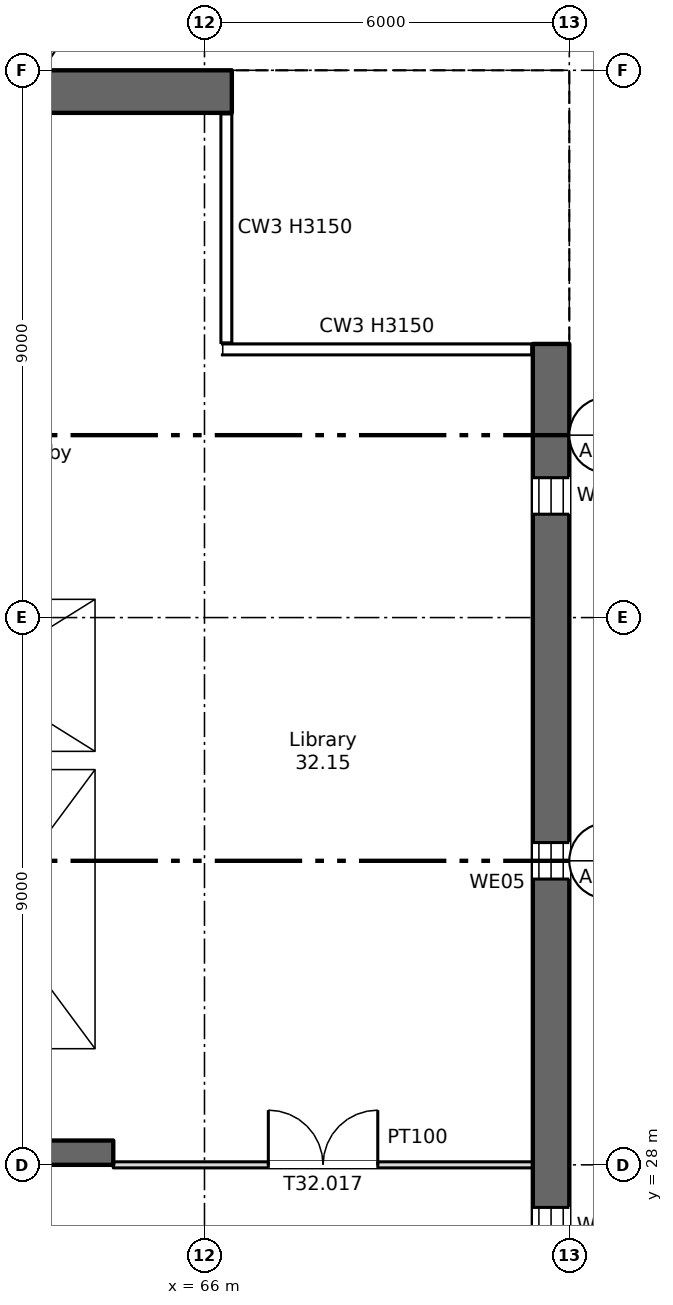
"""IFC4 building model, lengths in metres.
Left out: names, types, materials, properties, quantities, classifications, styles, units other than length and angle.
Written with IfcOpenShell. Run it as: python <this file> out.ifc"""

import sys

from ifc_helpers import new_model, si_unit, direction, frame, frame_2d, origin, place, context, subcontext, project, spatial, rectangle, extrude, element, fill, save


model = new_model("IFC4")
c1 = context("Model", 3, precision=1e-05, world=origin(), true_north=direction((0.0, 1.0)))
c2 = subcontext(c1, "Body", "Model", "MODEL_VIEW")
j1 = project(units=[si_unit("LENGTHUNIT", "METRE"), si_unit("PLANEANGLEUNIT", "RADIAN")], contexts=[c1])
p1 = place(None, origin())
s1 = spatial("IfcSite", under=j1, at=p1, CompositionType="ELEMENT")
p2 = place(p1, origin())
s2 = spatial("IfcBuilding", under=s1, at=p2, CompositionType="ELEMENT")
p3 = place(p2, frame((0.0, 0.0, 223.0)))
s3 = spatial("IfcBuildingStorey", under=s2, at=p3, CompositionType="ELEMENT", Elevation=223.0)
p4 = place(p3, frame((71.7, 7.5, 0.0), z_axis=(0.0, 0.0, 1.0), x_axis=(0.0, 1.0, 0.0)))
e1 = element("IfcWall", 1, at=p4, inside=s3, PredefinedType="SHEAR", context=c2, shape_type="SweptSolid", body=[
    extrude(rectangle(XDim=34.0, YDim=0.6, at=frame_2d((17.0, 0.0))), origin(), (0.0, 0.0, 1.0), 3.15),
])
p5 = place(p4, frame((1.2, 0.0, 0.6)))
e2 = element("IfcOpeningElement", 2, at=p5, cuts=e1, PredefinedType="OPENING", context=c2, shape_type="SweptSolid", body=[
    extrude(rectangle(XDim=0.6, YDim=2.4, at=frame_2d((0.3, 1.2))), frame((0.0, 0.31, 0.0), z_axis=(0.0, -1.0, 0.0), x_axis=(1.0, 0.0, 0.0)), (0.0, 0.0, 1.0), 0.62),
])
p6 = place(p4, frame((7.2, 0.0, 0.6)))
e3 = element("IfcOpeningElement", 3, at=p6, cuts=e1, PredefinedType="OPENING", context=c2, shape_type="SweptSolid", body=[
    extrude(rectangle(XDim=0.6, YDim=2.4, at=frame_2d((0.3, 1.2))), frame((0.0, 0.31, 0.0), z_axis=(0.0, -1.0, 0.0), x_axis=(1.0, 0.0, 0.0)), (0.0, 0.0, 1.0), 0.62),
])
p7 = place(p4, frame((13.2, 0.0, 0.6)))
e4 = element("IfcOpeningElement", 4, at=p7, cuts=e1, PredefinedType="OPENING", context=c2, shape_type="SweptSolid", body=[
    extrude(rectangle(XDim=0.6, YDim=2.4, at=frame_2d((0.3, 1.2))), frame((0.0, 0.31, 0.0), z_axis=(0.0, -1.0, 0.0), x_axis=(1.0, 0.0, 0.0)), (0.0, 0.0, 1.0), 0.62),
])
p8 = place(p4, frame((19.2, 0.0, 0.6)))
e5 = element("IfcOpeningElement", 5, at=p8, cuts=e1, PredefinedType="OPENING", context=c2, shape_type="SweptSolid", body=[
    extrude(rectangle(XDim=0.6, YDim=2.4, at=frame_2d((0.3, 1.2))), frame((0.0, 0.31, 0.0), z_axis=(0.0, -1.0, 0.0), x_axis=(1.0, 0.0, 0.0)), (0.0, 0.0, 1.0), 0.62),
])
p9 = place(p4, frame((25.2, 0.0, 0.6)))
e6 = element("IfcOpeningElement", 6, at=p9, cuts=e1, PredefinedType="OPENING", context=c2, shape_type="SweptSolid", body=[
    extrude(rectangle(XDim=0.6, YDim=2.4, at=frame_2d((0.3, 1.2))), frame((0.0, 0.31, 0.0), z_axis=(0.0, -1.0, 0.0), x_axis=(1.0, 0.0, 0.0)), (0.0, 0.0, 1.0), 0.62),
])
p10 = place(p4, frame((31.2, 0.0, 0.6)))
e7 = element("IfcOpeningElement", 7, at=p10, cuts=e1, PredefinedType="OPENING", context=c2, shape_type="SweptSolid", body=[
    extrude(rectangle(XDim=0.6, YDim=2.4, at=frame_2d((0.3, 1.2))), frame((0.0, 0.31, 0.0), z_axis=(0.0, -1.0, 0.0), x_axis=(1.0, 0.0, 0.0)), (0.0, 0.0, 1.0), 0.62),
])
p11 = place(p3, frame((11.55, 45.65, 0.0), z_axis=(0.0, 0.0, 1.0), x_axis=(1.0, 0.0, 0.0)))
e8 = element("IfcWall", 8, at=p11, inside=s3, PredefinedType="SHEAR", context=c2, shape_type="SweptSolid", body=[
    extrude(rectangle(XDim=54.9, YDim=0.7, at=frame_2d((27.45, 0.0))), origin(), (0.0, 0.0, 1.0), 3.15),
])
p12 = place(p11, frame((1.2, 0.0, 0.6)))
e9 = element("IfcOpeningElement", 9, at=p12, cuts=e8, PredefinedType="OPENING", context=c2, shape_type="SweptSolid", body=[
    extrude(rectangle(XDim=0.6, YDim=2.4, at=frame_2d((0.3, 1.2))), frame((0.0, 0.36, 0.0), z_axis=(0.0, -1.0, 0.0), x_axis=(1.0, 0.0, 0.0)), (0.0, 0.0, 1.0), 0.72),
])
p13 = place(p3, frame((6.6, 28.2, 0.0), z_axis=(0.0, 0.0, 1.0), x_axis=(1.0, 0.0, 0.0)))
e10 = element("IfcWall", 10, at=p13, inside=s3, PredefinedType="SHEAR", context=c2, shape_type="SweptSolid", body=[
    extrude(rectangle(XDim=57.9, YDim=0.4, at=frame_2d((28.95, 0.0))), origin(), (0.0, 0.0, 1.0), 3.15),
])
p14 = place(p13, frame((12.163, 0.0, 0.0)))
e11 = element("IfcOpeningElement", 11, at=p14, cuts=e10, PredefinedType="OPENING", context=c2, shape_type="SweptSolid", body=[
    extrude(rectangle(XDim=0.9, YDim=2.1, at=frame_2d((0.45, 1.05))), frame((0.0, 0.21, 0.0), z_axis=(0.0, -1.0, 0.0), x_axis=(1.0, 0.0, 0.0)), (0.0, 0.0, 1.0), 0.42),
])
p15 = place(p13, frame((14.738, 0.0, 0.0)))
e12 = element("IfcOpeningElement", 12, at=p15, cuts=e10, PredefinedType="OPENING", context=c2, shape_type="SweptSolid", body=[
    extrude(rectangle(XDim=0.9, YDim=2.1, at=frame_2d((0.45, 1.05))), frame((0.0, 0.21, 0.0), z_axis=(0.0, -1.0, 0.0), x_axis=(1.0, 0.0, 0.0)), (0.0, 0.0, 1.0), 0.42),
])
p16 = place(p13, frame((49.163, 0.0, 0.0)))
e13 = element("IfcOpeningElement", 13, at=p16, cuts=e10, PredefinedType="OPENING", context=c2, shape_type="SweptSolid", body=[
    extrude(rectangle(XDim=0.9, YDim=2.1, at=frame_2d((0.45, 1.05))), frame((0.0, 0.21, 0.0), z_axis=(0.0, -1.0, 0.0), x_axis=(1.0, 0.0, 0.0)), (0.0, 0.0, 1.0), 0.42),
])
p17 = place(p13, frame((51.738, 0.0, 0.0)))
e14 = element("IfcOpeningElement", 14, at=p17, cuts=e10, PredefinedType="OPENING", context=c2, shape_type="SweptSolid", body=[
    extrude(rectangle(XDim=0.9, YDim=2.1, at=frame_2d((0.45, 1.05))), frame((0.0, 0.21, 0.0), z_axis=(0.0, -1.0, 0.0), x_axis=(1.0, 0.0, 0.0)), (0.0, 0.0, 1.0), 0.42),
])
p18 = place(p13, frame((1.45, 0.0, 0.0)))
e15 = element("IfcOpeningElement", 15, at=p18, cuts=e10, PredefinedType="OPENING", context=c2, shape_type="SweptSolid", body=[
    extrude(rectangle(XDim=0.9, YDim=2.1, at=frame_2d((0.45, 1.05))), frame((0.0, 0.21, 0.0), z_axis=(0.0, -1.0, 0.0), x_axis=(1.0, 0.0, 0.0)), (0.0, 0.0, 1.0), 0.42),
])
p19 = place(p13, frame((4.8, 0.0, 0.0)))
e16 = element("IfcOpeningElement", 16, at=p19, cuts=e10, PredefinedType="OPENING", context=c2, shape_type="SweptSolid", body=[
    extrude(rectangle(XDim=1.2, YDim=2.1, at=frame_2d((0.6, 1.05))), frame((0.0, 0.21, 0.0), z_axis=(0.0, -1.0, 0.0), x_axis=(1.0, 0.0, 0.0)), (0.0, 0.0, 1.0), 0.42),
])
p20 = place(p13, frame((31.8, 0.0, 0.0)))
e17 = element("IfcOpeningElement", 17, at=p20, cuts=e10, PredefinedType="OPENING", context=c2, shape_type="SweptSolid", body=[
    extrude(rectangle(XDim=1.2, YDim=2.1, at=frame_2d((0.6, 1.05))), frame((0.0, 0.21, 0.0), z_axis=(0.0, -1.0, 0.0), x_axis=(1.0, 0.0, 0.0)), (0.0, 0.0, 1.0), 0.42),
])
p21 = place(p13, frame((55.3, 0.0, 0.0)))
e18 = element("IfcOpeningElement", 18, at=p21, cuts=e10, PredefinedType="OPENING", context=c2, shape_type="SweptSolid", body=[
    extrude(rectangle(XDim=1.2, YDim=2.1, at=frame_2d((0.6, 1.05))), frame((0.0, 0.21, 0.0), z_axis=(0.0, -1.0, 0.0), x_axis=(1.0, 0.0, 0.0)), (0.0, 0.0, 1.0), 0.42),
])
p22 = place(p13, frame((21.8, 0.0, 0.0)))
e19 = element("IfcOpeningElement", 19, at=p22, cuts=e10, PredefinedType="OPENING", context=c2, shape_type="SweptSolid", body=[
    extrude(rectangle(XDim=1.2, YDim=2.1, at=frame_2d((0.6, 1.05))), frame((0.0, 0.21, 0.0), z_axis=(0.0, -1.0, 0.0), x_axis=(1.0, 0.0, 0.0)), (0.0, 0.0, 1.0), 0.42),
])
p23 = place(p13, frame((41.8, 0.0, 0.0)))
e20 = element("IfcOpeningElement", 20, at=p23, cuts=e10, PredefinedType="OPENING", context=c2, shape_type="SweptSolid", body=[
    extrude(rectangle(XDim=1.2, YDim=2.1, at=frame_2d((0.6, 1.05))), frame((0.0, 0.21, 0.0), z_axis=(0.0, -1.0, 0.0), x_axis=(1.0, 0.0, 0.0)), (0.0, 0.0, 1.0), 0.42),
])
p24 = place(p13, frame((24.95, 0.0, 0.0)))
e21 = element("IfcOpeningElement", 21, at=p24, cuts=e10, PredefinedType="OPENING", context=c2, shape_type="SweptSolid", body=[
    extrude(rectangle(XDim=2.4, YDim=2.1, at=frame_2d((1.2, 1.05))), frame((0.0, 0.21, 0.0), z_axis=(0.0, -1.0, 0.0), x_axis=(1.0, 0.0, 0.0)), (0.0, 0.0, 1.0), 0.42),
])
p25 = place(p13, frame((37.45, 0.0, 0.0)))
e22 = element("IfcOpeningElement", 22, at=p25, cuts=e10, PredefinedType="OPENING", context=c2, shape_type="SweptSolid", body=[
    extrude(rectangle(XDim=2.4, YDim=2.1, at=frame_2d((1.2, 1.05))), frame((0.0, 0.21, 0.0), z_axis=(0.0, -1.0, 0.0), x_axis=(1.0, 0.0, 0.0)), (0.0, 0.0, 1.0), 0.42),
])
p26 = place(p13, frame((8.1, 0.0, 0.0)))
e23 = element("IfcOpeningElement", 23, at=p26, cuts=e10, PredefinedType="OPENING", context=c2, shape_type="SweptSolid", body=[
    extrude(rectangle(XDim=2.4, YDim=2.1, at=frame_2d((1.2, 1.05))), frame((0.0, 0.21, 0.0), z_axis=(0.0, -1.0, 0.0), x_axis=(1.0, 0.0, 0.0)), (0.0, 0.0, 1.0), 0.42),
])
p27 = place(p13, frame((28.95, 0.0, 0.0)))
e24 = element("IfcOpeningElement", 24, at=p27, cuts=e10, PredefinedType="OPENING", context=c2, shape_type="SweptSolid", body=[
    extrude(rectangle(XDim=0.9, YDim=2.1, at=frame_2d((0.45, 1.05))), frame((0.0, 0.21, 0.0), z_axis=(0.0, -1.0, 0.0), x_axis=(1.0, 0.0, 0.0)), (0.0, 0.0, 1.0), 0.42),
])
p28 = place(p13, frame((34.95, 0.0, 0.0)))
e25 = element("IfcOpeningElement", 25, at=p28, cuts=e10, PredefinedType="OPENING", context=c2, shape_type="SweptSolid", body=[
    extrude(rectangle(XDim=0.9, YDim=2.1, at=frame_2d((0.45, 1.05))), frame((0.0, 0.21, 0.0), z_axis=(0.0, -1.0, 0.0), x_axis=(1.0, 0.0, 0.0)), (0.0, 0.0, 1.0), 0.42),
])
p29 = place(p3, frame((64.35, 34.8, 0.0), z_axis=(0.0, 0.0, 1.0), x_axis=(0.0, 1.0, 0.0)))
e26 = element("IfcWall", 26, at=p29, inside=s3, PredefinedType="SHEAR", context=c2, shape_type="SweptSolid", body=[
    extrude(rectangle(XDim=10.5, YDim=0.3, at=frame_2d((5.25, 0.0))), origin(), (0.0, 0.0, 1.0), 3.15),
])
p30 = place(p3, frame((64.35, 28.4, 0.0), z_axis=(0.0, 0.0, 1.0), x_axis=(0.0, 1.0, 0.0)))
e27 = element("IfcWall", 27, at=p30, inside=s3, PredefinedType="SHEAR", context=c2, shape_type="SweptSolid", body=[
    extrude(rectangle(XDim=6.1, YDim=0.3, at=frame_2d((3.05, 0.0))), origin(), (0.0, 0.0, 1.0), 3.15),
])
p31 = place(p3, frame((60.2, 34.65, 0.0), z_axis=(0.0, 0.0, 1.0), x_axis=(1.0, 0.0, 0.0)))
e28 = element("IfcWall", 28, at=p31, inside=s3, PredefinedType="SHEAR", context=c2, shape_type="SweptSolid", body=[
    extrude(rectangle(XDim=4.3, YDim=0.3, at=frame_2d((2.15, 0.0))), origin(), (0.0, 0.0, 1.0), 3.15),
])
p32 = place(p3, frame((60.2, 37.45, 0.0), z_axis=(0.0, 0.0, 1.0), x_axis=(1.0, 0.0, 0.0)))
e29 = element("IfcWall", 29, at=p32, inside=s3, PredefinedType="SHEAR", context=c2, shape_type="SweptSolid", body=[
    extrude(rectangle(XDim=4.0, YDim=0.3, at=frame_2d((2.0, 0.0))), origin(), (0.0, 0.0, 1.0), 3.15),
])
p33 = place(p32, frame((1.45, 0.0, 0.0)))
e30 = element("IfcOpeningElement", 30, at=p33, cuts=e29, PredefinedType="OPENING", context=c2, shape_type="SweptSolid", body=[
    extrude(rectangle(XDim=1.1, YDim=2.1, at=frame_2d((0.55, 1.05))), frame((0.0, 0.16, 0.0), z_axis=(0.0, -1.0, 0.0), x_axis=(1.0, 0.0, 0.0)), (0.0, 0.0, 1.0), 0.32),
])
p34 = place(p3, frame((64.5, 28.0, 0.0), z_axis=(0.0, 0.0, 1.0), x_axis=(1.0, 0.0, 0.0)))
e31 = element("IfcWall", 31, at=p34, inside=s3, PredefinedType="PARTITIONING", context=c2, shape_type="SweptSolid", body=[
    extrude(rectangle(XDim=6.9, YDim=0.1, at=frame_2d((3.45, 0.0))), origin(), (0.0, 0.0, 1.0), 3.15),
])
p35 = place(p34, frame((2.55, 0.0, 0.0)))
e32 = element("IfcOpeningElement", 32, at=p35, cuts=e31, PredefinedType="OPENING", context=c2, shape_type="SweptSolid", body=[
    extrude(rectangle(XDim=1.8, YDim=2.1, at=frame_2d((0.9, 1.05))), frame((0.0, 0.06, 0.0), z_axis=(0.0, -1.0, 0.0), x_axis=(1.0, 0.0, 0.0)), (0.0, 0.0, 1.0), 0.12),
])
p36 = place(p8, origin())
e33 = element("IfcWindow", 33, at=p36, inside=s3, PartitioningType="SINGLE_PANEL", PredefinedType="WINDOW", context=c2, shape_type="SweptSolid", body=[
    extrude(rectangle(XDim=0.6, YDim=2.4, at=frame_2d((0.3, 1.2))), frame((0.0, 0.03, 0.0), z_axis=(0.0, -1.0, 0.0), x_axis=(1.0, 0.0, 0.0)), (0.0, 0.0, 1.0), 0.06),
])
fill(e5, e33)
p37 = place(p9, origin())
e34 = element("IfcWindow", 34, at=p37, inside=s3, PartitioningType="SINGLE_PANEL", PredefinedType="WINDOW", context=c2, shape_type="SweptSolid", body=[
    extrude(rectangle(XDim=0.6, YDim=2.4, at=frame_2d((0.3, 1.2))), frame((0.0, 0.03, 0.0), z_axis=(0.0, -1.0, 0.0), x_axis=(1.0, 0.0, 0.0)), (0.0, 0.0, 1.0), 0.06),
])
fill(e6, e34)
p38 = place(p10, origin())
e35 = element("IfcWindow", 35, at=p38, inside=s3, PartitioningType="SINGLE_PANEL", PredefinedType="WINDOW", context=c2, shape_type="SweptSolid", body=[
    extrude(rectangle(XDim=0.6, YDim=2.4, at=frame_2d((0.3, 1.2))), frame((0.0, 0.03, 0.0), z_axis=(0.0, -1.0, 0.0), x_axis=(1.0, 0.0, 0.0)), (0.0, 0.0, 1.0), 0.06),
])
fill(e7, e35)
p39 = place(p35, origin())
e36 = element("IfcDoor", 36, at=p39, inside=s3, OperationType="DOUBLE_DOOR_SINGLE_SWING", PredefinedType="DOOR", context=c2, shape_type="SweptSolid", body=[
    extrude(rectangle(XDim=1.8, YDim=2.1, at=frame_2d((0.9, 1.05))), frame((0.0, 0.025, 0.0), z_axis=(0.0, -1.0, 0.0), x_axis=(1.0, 0.0, 0.0)), (0.0, 0.0, 1.0), 0.05),
])
fill(e32, e36)
save(model, sys.argv[1])
